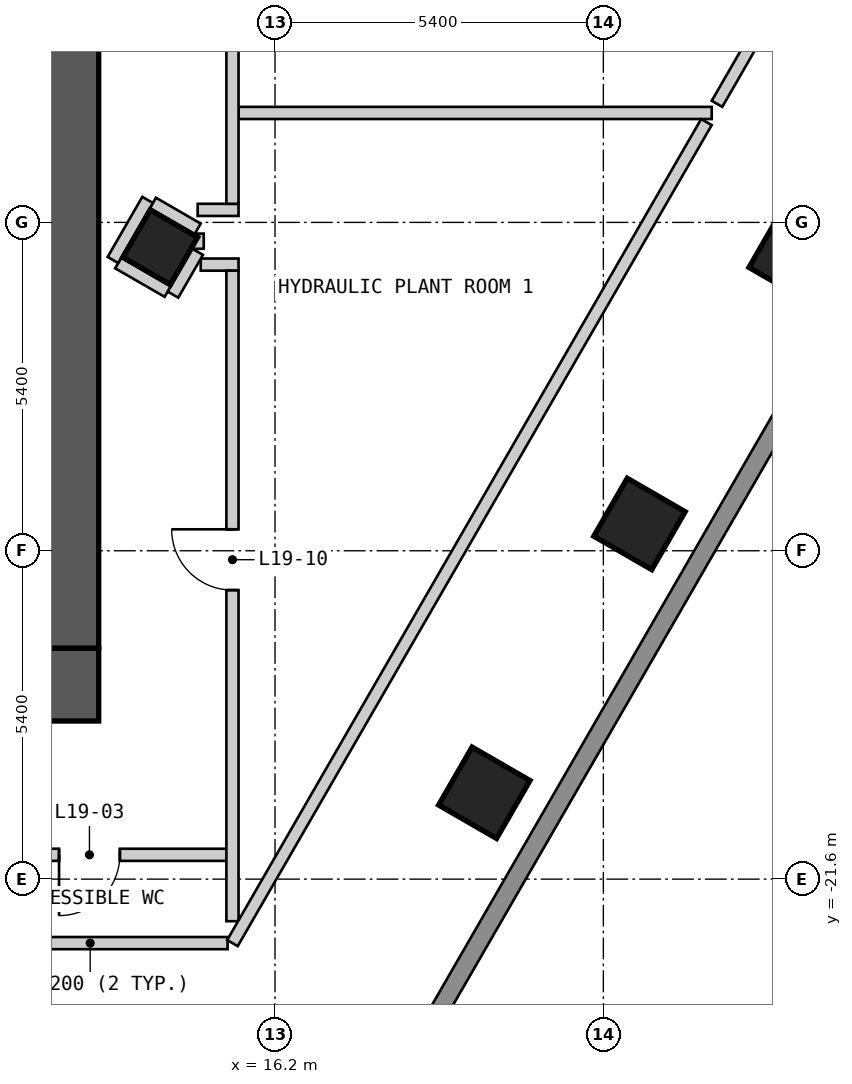
"""IFC4 building model, lengths in metres.
Left out: names, types, materials, properties, quantities, classifications, styles, units other than length and angle.
Written with IfcOpenShell. Run it as: python <this file> out.ifc"""

import sys

from ifc_helpers import new_model, si_unit, direction, frame, frame_2d, origin, origin_2d, place, context, subcontext, project, spatial, polyline, rectangle, outline, extrude, element, fill, save


model = new_model("IFC4")
c1 = context("Model", 3, precision=1e-05, world=origin(), true_north=direction((0.0, 1.0)))
c2 = subcontext(c1, "Body", "Model", "MODEL_VIEW")
j1 = project(units=[si_unit("LENGTHUNIT", "METRE"), si_unit("PLANEANGLEUNIT", "RADIAN")], contexts=[c1])
p1 = place(None, origin())
s1 = spatial("IfcSite", under=j1, at=p1, CompositionType="ELEMENT")
p2 = place(p1, origin())
s2 = spatial("IfcBuilding", under=s1, at=p2, CompositionType="ELEMENT")
p3 = place(p2, frame((0.0, 0.0, 62.4)))
s3 = spatial("IfcBuildingStorey", under=s2, at=p3, CompositionType="ELEMENT", Elevation=62.4)
p4 = place(p3, frame((19.642, -20.18, 0.0), z_axis=(0.0, 0.0, 1.0), x_axis=(0.499984884929, 0.866034130299, 0.0)))
e1 = element("IfcColumn", 1, at=p4, inside=s3, PredefinedType="COLUMN", context=c2, shape_type="SweptSolid", body=[
    extrude(rectangle(XDim=1.1, YDim=1.1, at=origin_2d()), origin(), (0.0, 0.0, 1.0), 3.6),
])
for number, where, z_axis, x_axis in (
    (2, (22.194, -15.759, 0.0), (0.0, 0.0, 1.0), (0.5, 0.866, 0.0)),
    (3, (24.746, -11.339, 0.0), (0.0, 0.0, 1.0), (0.5, 0.866, 0.0)),
):
    element("IfcColumn", number, at=place(p3, frame(where, z_axis=z_axis, x_axis=x_axis)), inside=s3, PredefinedType="COLUMN", context=c2, shape_type="SweptSolid", body=[
        extrude(rectangle(XDim=1.1, YDim=1.1, at=origin_2d()), origin(), (0.0, 0.0, 1.0), 2.6),
    ])
p5 = place(p3, frame((14.313, -11.209, 0.0), z_axis=(0.0, 0.0, 1.0), x_axis=(0.499984884929, 0.866034130299, 0.0)))
e4 = element("IfcColumn", 4, at=p5, inside=s3, PredefinedType="COLUMN", context=c2, shape_type="SweptSolid", body=[
    extrude(rectangle(XDim=0.9, YDim=0.9, at=origin_2d()), origin(), (0.0, 0.0, 1.0), 2.6),
])
p6 = place(p3, frame((-13.3, -18.4, 0.0), z_axis=(0.0, 0.0, 1.0), x_axis=(1.0, 0.0, 0.0)))
e5 = element("IfcWall", 5, at=p6, inside=s3, PredefinedType="SHEAR", context=c2, shape_type="SweptSolid", body=[
    extrude(rectangle(XDim=26.6, YDim=1.2, at=frame_2d((13.3, 0.0))), origin(), (0.0, 0.0, 1.0), 2.6),
])
p7 = place(p3, frame((12.7, -17.8, 0.0), z_axis=(0.0, 0.0, 1.0), x_axis=(0.0, 1.0, 0.0)))
e6 = element("IfcWall", 6, at=p7, inside=s3, PredefinedType="SHEAR", context=c2, shape_type="SweptSolid", body=[
    extrude(rectangle(XDim=11.6, YDim=1.2, at=frame_2d((5.8, 0.0))), origin(), (0.0, 0.0, 1.0), 2.6),
])
p8 = place(p3, frame((17.71, -25.825, 0.0), z_axis=(0.0, 0.0, 1.0), x_axis=(0.500001938803, 0.866024284413, 0.0)))
e7 = element("IfcWall", 7, at=p8, inside=s3, PredefinedType="SOLIDWALL", context=c2, shape_type="SweptSolid", body=[
    extrude(outline(polyline([(0.0, -0.15), (27.02, -0.15), (26.94, 0.15), (0.08, 0.15), (0.0, -0.15)])), origin(), (0.0, 0.0, 1.0), 2.6),
])
p9 = place(p3, frame((10.9, -22.652, 0.0), z_axis=(0.0, 0.0, 1.0), x_axis=(1.0, 0.0, 0.0)))
e8 = element("IfcWall", 8, at=p9, inside=s3, PredefinedType="PARTITIONING", context=c2, shape_type="SweptSolid", body=[
    extrude(rectangle(XDim=4.52, YDim=0.2, at=frame_2d((2.26, 0.0))), origin(), (0.0, 0.0, 1.0), 2.6),
])
p10 = place(p3, frame((-12.532, -21.2, 0.0), z_axis=(0.0, 0.0, 1.0), x_axis=(1.0, 0.0, 0.0)))
e9 = element("IfcWall", 9, at=p10, inside=s3, PredefinedType="PARTITIONING", context=c2, shape_type="SweptSolid", body=[
    extrude(rectangle(XDim=28.032, YDim=0.2, at=frame_2d((14.016, 0.0))), origin(), (0.0, 0.0, 1.0), 2.6),
])
p11 = place(p10, frame((13.032, 0.0, 0.0), z_axis=(0.0, 0.0, 1.0), x_axis=(-1.0, 0.0, 0.0)))
e10 = element("IfcOpeningElement", 10, at=p11, cuts=e9, PredefinedType="OPENING", context=c2, shape_type="SweptSolid", body=[
    extrude(rectangle(XDim=1.0, YDim=2.1, at=frame_2d((0.5, 1.05))), frame((0.0, 0.11, 0.0), z_axis=(0.0, -1.0, 0.0), x_axis=(1.0, 0.0, 0.0)), (0.0, 0.0, 1.0), 0.22),
])
p12 = place(p10, frame((26.18, 0.0, 0.0), z_axis=(0.0, 0.0, 1.0), x_axis=(-1.0, 0.0, 0.0)))
e11 = element("IfcOpeningElement", 11, at=p12, cuts=e9, PredefinedType="OPENING", context=c2, shape_type="SweptSolid", body=[
    extrude(rectangle(XDim=1.0, YDim=2.1, at=frame_2d((0.5, 1.05))), frame((0.0, 0.11, 0.0), z_axis=(0.0, -1.0, 0.0), x_axis=(1.0, 0.0, 0.0)), (0.0, 0.0, 1.0), 0.22),
])
p13 = place(p3, frame((14.978, -11.494, 0.0), z_axis=(0.0, 0.0, 1.0), x_axis=(1.0, 0.0, 0.0)))
e12 = element("IfcWall", 12, at=p13, inside=s3, PredefinedType="SOLIDWALL", context=c2, shape_type="SweptSolid", body=[
    extrude(rectangle(XDim=0.622, YDim=0.2, at=frame_2d((0.311, 0.0))), origin(), (0.0, 0.0, 1.0), 2.6),
])
p14 = place(p3, frame((14.928, -10.594, 0.0), z_axis=(0.0, 0.0, 1.0), x_axis=(1.0, 0.0, 0.0)))
e13 = element("IfcWall", 13, at=p14, inside=s3, PredefinedType="SOLIDWALL", context=c2, shape_type="SweptSolid", body=[
    extrude(rectangle(XDim=0.672, YDim=0.2, at=frame_2d((0.336, 0.0))), origin(), (0.0, 0.0, 1.0), 2.6),
])
p15 = place(p3, frame((15.6, -9.0, 0.0), z_axis=(0.0, 0.0, 1.0), x_axis=(1.0, 0.0, 0.0)))
e14 = element("IfcWall", 14, at=p15, inside=s3, PredefinedType="SOLIDWALL", context=c2, shape_type="SweptSolid", body=[
    extrude(rectangle(XDim=7.782, YDim=0.2, at=frame_2d((3.891, 0.0))), origin(), (0.0, 0.0, 1.0), 2.6),
])
p16 = place(p3, frame((14.928, -11.234, 0.0), z_axis=(0.0, 0.0, 1.0), x_axis=(0.0, 1.0, 0.0)))
e15 = element("IfcWall", 15, at=p16, inside=s3, PredefinedType="SOLIDWALL", context=c2, shape_type="SweptSolid", body=[
    extrude(rectangle(XDim=0.25, YDim=0.2, at=frame_2d((0.125, 0.0))), origin(), (0.0, 0.0, 1.0), 2.6),
])
p17 = place(p3, frame((15.5, -22.292, 0.0), z_axis=(0.0, 0.0, 1.0), x_axis=(0.0, 1.0, 0.0)))
e16 = element("IfcWall", 16, at=p17, inside=s3, PredefinedType="SOLIDWALL", context=c2, shape_type="SweptSolid", body=[
    extrude(rectangle(XDim=10.698, YDim=0.2, at=frame_2d((5.349, 0.0))), origin(), (0.0, 0.0, 1.0), 2.6),
])
p18 = place(p17, frame((6.445, 0.0, 0.0), z_axis=(0.0, 0.0, 1.0), x_axis=(-1.0, 0.0, 0.0)))
e17 = element("IfcOpeningElement", 17, at=p18, cuts=e16, PredefinedType="OPENING", context=c2, shape_type="SweptSolid", body=[
    extrude(rectangle(XDim=1.0, YDim=2.1, at=frame_2d((0.5, 1.05))), frame((0.0, 0.11, 0.0), z_axis=(0.0, -1.0, 0.0), x_axis=(1.0, 0.0, 0.0)), (0.0, 0.0, 1.0), 0.22),
])
p19 = place(p3, frame((15.5, -10.494, 0.0), z_axis=(0.0, 0.0, 1.0), x_axis=(0.0, 1.0, 0.0)))
e18 = element("IfcWall", 18, at=p19, inside=s3, PredefinedType="SOLIDWALL", context=c2, shape_type="SweptSolid", body=[
    extrude(rectangle(XDim=12.394, YDim=0.2, at=frame_2d((6.197, 0.0))), origin(), (0.0, 0.0, 1.0), 2.6),
])
p20 = place(p19, frame((7.492, 0.0, 0.0), z_axis=(0.0, 0.0, 1.0), x_axis=(-1.0, 0.0, 0.0)))
e19 = element("IfcOpeningElement", 19, at=p20, cuts=e18, PredefinedType="OPENING", context=c2, shape_type="SweptSolid", body=[
    extrude(rectangle(XDim=1.0, YDim=2.1, at=frame_2d((0.5, 1.05))), frame((0.0, 0.11, 0.0), z_axis=(0.0, -1.0, 0.0), x_axis=(1.0, 0.0, 0.0)), (0.0, 0.0, 1.0), 0.22),
])
p21 = place(p3, frame((13.621, -11.468, 0.0), z_axis=(0.0, 0.0, 1.0), x_axis=(0.866012558475, -0.500022248069, 0.0)))
e20 = element("IfcWall", 20, at=p21, inside=s3, PredefinedType="SOLIDWALL", context=c2, shape_type="SweptSolid", body=[
    extrude(rectangle(XDim=0.94, YDim=0.2, at=frame_2d((0.47, 0.0))), origin(), (0.0, 0.0, 1.0), 2.6),
])
p22 = place(p3, frame((14.191, -10.48, 0.0), z_axis=(0.0, 0.0, 1.0), x_axis=(0.865779484054, -0.500425703768, 0.0)))
e21 = element("IfcWall", 21, at=p22, inside=s3, PredefinedType="SOLIDWALL", context=c2, shape_type="SweptSolid", body=[
    extrude(rectangle(XDim=0.851, YDim=0.2, at=frame_2d((0.426, 0.0))), origin(), (0.0, 0.0, 1.0), 2.6),
])
p23 = place(p3, frame((15.5, -22.652, 0.0), z_axis=(0.0, 0.0, 1.0), x_axis=(0.499972322153, 0.866041383007, 0.0)))
e22 = element("IfcWall", 22, at=p23, inside=s3, PredefinedType="SOLIDWALL", context=c2, shape_type="SweptSolid", body=[
    extrude(rectangle(XDim=15.591, YDim=0.2, at=frame_2d((7.795, 0.0))), origin(), (0.0, 0.0, 1.0), 2.6),
])
p24 = place(p3, frame((23.469, -8.85, 0.0), z_axis=(0.0, 0.0, 1.0), x_axis=(0.499956732914, 0.866050382607, 0.0)))
e23 = element("IfcWall", 23, at=p24, inside=s3, PredefinedType="SOLIDWALL", context=c2, shape_type="SweptSolid", body=[
    extrude(rectangle(XDim=8.089, YDim=0.2, at=frame_2d((4.044, 0.0))), origin(), (0.0, 0.0, 1.0), 2.6),
])
p25 = place(p3, frame((13.534, -11.418, 0.0), z_axis=(0.0, 0.0, 1.0), x_axis=(0.499753333889, 0.8661677697, 0.0)))
e24 = element("IfcWall", 24, at=p25, inside=s3, PredefinedType="SOLIDWALL", context=c2, shape_type="SweptSolid", body=[
    extrude(rectangle(XDim=1.141, YDim=0.2, at=frame_2d((0.57, 0.0))), origin(), (0.0, 0.0, 1.0), 2.6),
])
p26 = place(p3, frame((14.522, -11.988, 0.0), z_axis=(0.0, 0.0, 1.0), x_axis=(0.49953174516, 0.866295582106, 0.0)))
e25 = element("IfcWall", 25, at=p26, inside=s3, PredefinedType="SOLIDWALL", context=c2, shape_type="SweptSolid", body=[
    extrude(rectangle(XDim=0.813, YDim=0.2, at=frame_2d((0.406, 0.0))), origin(), (0.0, 0.0, 1.0), 2.6),
])
p27 = place(p12, origin())
e26 = element("IfcDoor", 26, at=p27, inside=s3, OperationType="SINGLE_SWING_RIGHT", PredefinedType="DOOR", context=c2, shape_type="SweptSolid", body=[
    extrude(rectangle(XDim=1.0, YDim=2.1, at=frame_2d((0.5, 1.05))), frame((0.0, 0.025, 0.0), z_axis=(0.0, -1.0, 0.0), x_axis=(1.0, 0.0, 0.0)), (0.0, 0.0, 1.0), 0.05),
])
fill(e11, e26)
p28 = place(p18, origin())
e27 = element("IfcDoor", 27, at=p28, inside=s3, OperationType="SINGLE_SWING_LEFT", PredefinedType="DOOR", context=c2, shape_type="SweptSolid", body=[
    extrude(rectangle(XDim=1.0, YDim=2.1, at=frame_2d((0.5, 1.05))), frame((0.0, 0.025, 0.0), z_axis=(0.0, -1.0, 0.0), x_axis=(1.0, 0.0, 0.0)), (0.0, 0.0, 1.0), 0.05),
])
fill(e17, e27)
save(model, sys.argv[1])
